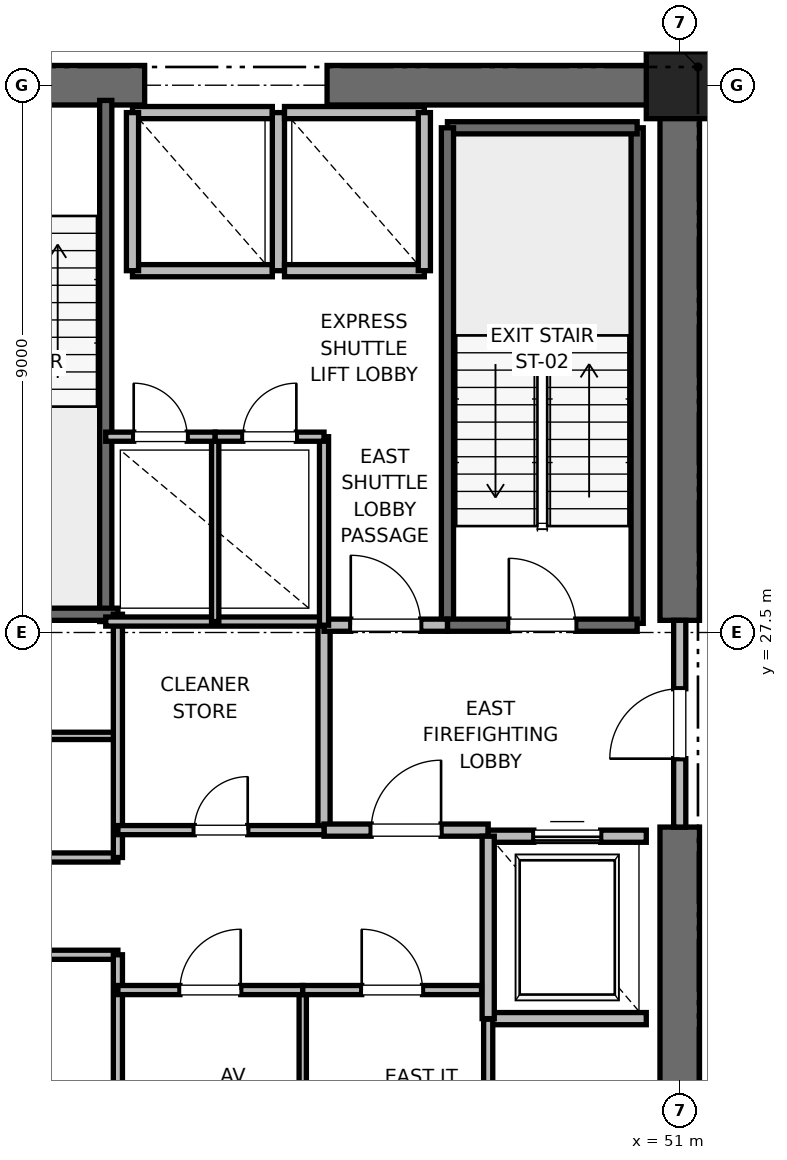
"""IFC4 building model, lengths in metres.
Left out: names, types, materials, properties, quantities, classifications, styles, units other than length and angle.
Written with IfcOpenShell. Run it as: python <this file> out.ifc"""

import sys

from ifc_helpers import new_model, si_unit, direction, frame, frame_2d, origin, origin_2d, place, context, subcontext, project, spatial, rectangle, extrude, element, fill, save


model = new_model("IFC4")
c1 = context("Model", 3, precision=1e-05, world=origin(), true_north=direction((0.0, 1.0)))
c2 = subcontext(c1, "Body", "Model", "MODEL_VIEW")
j1 = project(units=[si_unit("LENGTHUNIT", "METRE"), si_unit("PLANEANGLEUNIT", "RADIAN")], contexts=[c1])
p1 = place(None, origin())
s1 = spatial("IfcSite", under=j1, at=p1, CompositionType="ELEMENT")
p2 = place(p1, origin())
s2 = spatial("IfcBuilding", under=s1, at=p2, CompositionType="ELEMENT")
p3 = place(p2, frame((0.0, 0.0, 71.6)))
s3 = spatial("IfcBuildingStorey", under=s2, at=p3, CompositionType="ELEMENT", Elevation=71.6)
p4 = place(p3, frame((51.0, 36.5, 0.0), z_axis=(0.0, 0.0, 1.0), x_axis=(1.0, 0.0, 0.0)))
e1 = element("IfcColumn", 1, at=p4, inside=s3, PredefinedType="PILASTER", context=c2, shape_type="SweptSolid", body=[
    extrude(rectangle(XDim=1.1, YDim=1.1, at=origin_2d()), origin(), (0.0, 0.0, 1.0), 4.0),
])
p5 = place(p3, frame((37.8, 36.5, 0.0), z_axis=(0.0, 0.0, 1.0), x_axis=(1.0, 0.0, 0.0)))
e2 = element("IfcWall", 2, at=p5, inside=s3, PredefinedType="SHEAR", context=c2, shape_type="SweptSolid", body=[
    extrude(rectangle(XDim=4.4, YDim=0.65, at=frame_2d((2.2, 0.0))), origin(), (0.0, 0.0, 1.0), 3.76),
])
p6 = place(p5, frame((1.65, 0.0, 0.0)))
e3 = element("IfcOpeningElement", 3, at=p6, cuts=e2, PredefinedType="OPENING", context=c2, shape_type="SweptSolid", body=[
    extrude(rectangle(XDim=1.1, YDim=2.15, at=frame_2d((0.55, 1.075))), frame((0.0, 0.325, 0.0), z_axis=(0.0, -1.0, 0.0), x_axis=(1.0, 0.0, 0.0)), (0.0, 0.0, 1.0), 0.65),
])
for number, where, z_axis, x_axis in (
    (4, (45.2, 36.5, 0.0), (0.0, 0.0, 1.0), (1.0, 0.0, 0.0)),
    (5, (51.0, 18.5, 0.0), (0.0, 0.0, 1.0), (0.0, 1.0, 0.0)),
):
    element("IfcWall", number, at=place(p3, frame(where, z_axis=z_axis, x_axis=x_axis)), inside=s3, PredefinedType="SHEAR", context=c2, shape_type="SweptSolid", body=[
        extrude(rectangle(XDim=5.8, YDim=0.65, at=frame_2d((2.9, 0.0))), origin(), (0.0, 0.0, 1.0), 3.76),
    ])
p7 = place(p3, frame((51.0, 27.7, 0.0), z_axis=(0.0, 0.0, 1.0), x_axis=(0.0, 1.0, 0.0)))
e6 = element("IfcWall", 6, at=p7, inside=s3, PredefinedType="SHEAR", context=c2, shape_type="SweptSolid", body=[
    extrude(rectangle(XDim=8.8, YDim=0.65, at=frame_2d((4.4, 0.0))), origin(), (0.0, 0.0, 1.0), 3.76),
])
p8 = place(p3, frame((50.3, 27.65, 0.0), z_axis=(0.0, 0.0, 1.0), x_axis=(0.0, 1.0, 0.0)))
e7 = element("IfcWall", 7, at=p8, inside=s3, PredefinedType="SOLIDWALL", context=c2, shape_type="SweptSolid", body=[
    extrude(rectangle(XDim=8.15, YDim=0.2, at=frame_2d((4.075, 0.0))), origin(), (0.0, 0.0, 1.0), 3.76),
])
p9 = place(p3, frame((47.18, 35.8, 0.0), z_axis=(0.0, 0.0, 1.0), x_axis=(1.0, 0.0, 0.0)))
e8 = element("IfcWall", 8, at=p9, inside=s3, PredefinedType="SOLIDWALL", context=c2, shape_type="SweptSolid", body=[
    extrude(rectangle(XDim=3.12, YDim=0.2, at=frame_2d((1.56, 0.0))), origin(), (0.0, 0.0, 1.0), 3.76),
])
p10 = place(p3, frame((47.18, 27.62, 0.0), z_axis=(0.0, 0.0, 1.0), x_axis=(0.0, 1.0, 0.0)))
e9 = element("IfcWall", 9, at=p10, inside=s3, PredefinedType="SOLIDWALL", context=c2, shape_type="SweptSolid", body=[
    extrude(rectangle(XDim=8.18, YDim=0.2, at=frame_2d((4.09, 0.0))), origin(), (0.0, 0.0, 1.0), 3.76),
])
p11 = place(p3, frame((47.18, 27.62, 0.0), z_axis=(0.0, 0.0, 1.0), x_axis=(1.0, 0.0, 0.0)))
e10 = element("IfcWall", 10, at=p11, inside=s3, PredefinedType="SOLIDWALL", context=c2, shape_type="SweptSolid", body=[
    extrude(rectangle(XDim=3.12, YDim=0.2, at=frame_2d((1.56, 0.0))), origin(), (0.0, 0.0, 1.0), 3.76),
])
p12 = place(p11, frame((1.01, 0.0, 0.0)))
e11 = element("IfcOpeningElement", 11, at=p12, cuts=e10, PredefinedType="OPENING", context=c2, shape_type="SweptSolid", body=[
    extrude(rectangle(XDim=1.1, YDim=2.15, at=frame_2d((0.55, 1.075))), frame((0.0, 0.1, 0.0), z_axis=(0.0, -1.0, 0.0), x_axis=(1.0, 0.0, 0.0)), (0.0, 0.0, 1.0), 0.2),
])
p13 = place(p3, frame((41.56, 27.68, 0.0), z_axis=(0.0, 0.0, 1.0), x_axis=(0.0, 1.0, 0.0)))
e12 = element("IfcWall", 12, at=p13, inside=s3, PredefinedType="SOLIDWALL", context=c2, shape_type="SweptSolid", body=[
    extrude(rectangle(XDim=8.57, YDim=0.2, at=frame_2d((4.285, 0.0))), origin(), (0.0, 0.0, 1.0), 3.76),
])
p14 = place(p3, frame((38.44, 27.8, 0.0), z_axis=(0.0, 0.0, 1.0), x_axis=(1.0, 0.0, 0.0)))
e13 = element("IfcWall", 13, at=p14, inside=s3, PredefinedType="SOLIDWALL", context=c2, shape_type="SweptSolid", body=[
    extrude(rectangle(XDim=3.32, YDim=0.2, at=frame_2d((1.66, 0.0))), origin(), (0.0, 0.0, 1.0), 3.76),
])
p15 = place(p3, frame((45.15, 24.25, 0.0), z_axis=(0.0, 0.0, 1.0), x_axis=(0.0, 1.0, 0.0)))
e14 = element("IfcWall", 14, at=p15, inside=s3, PredefinedType="PARTITIONING", context=c2, shape_type="SweptSolid", body=[
    extrude(rectangle(XDim=3.37, YDim=0.2, at=frame_2d((1.685, 0.0))), origin(), (0.0, 0.0, 1.0), 3.76),
])
p16 = place(p3, frame((45.15, 24.25, 0.0), z_axis=(0.0, 0.0, 1.0), x_axis=(1.0, 0.0, 0.0)))
e15 = element("IfcWall", 15, at=p16, inside=s3, PredefinedType="PARTITIONING", context=c2, shape_type="SweptSolid", body=[
    extrude(rectangle(XDim=2.7, YDim=0.2, at=frame_2d((1.35, 0.0))), origin(), (0.0, 0.0, 1.0), 3.76),
])
p17 = place(p16, frame((0.775, 0.0, 0.0)))
e16 = element("IfcOpeningElement", 16, at=p17, cuts=e15, PredefinedType="OPENING", context=c2, shape_type="SweptSolid", body=[
    extrude(rectangle(XDim=1.15, YDim=2.2, at=frame_2d((0.575, 1.1))), frame((0.0, 0.1, 0.0), z_axis=(0.0, -1.0, 0.0), x_axis=(1.0, 0.0, 0.0)), (0.0, 0.0, 1.0), 0.2),
])
p18 = place(p3, frame((45.15, 27.62, 0.0), z_axis=(0.0, 0.0, 1.0), x_axis=(1.0, 0.0, 0.0)))
e17 = element("IfcWall", 17, at=p18, inside=s3, PredefinedType="PARTITIONING", context=c2, shape_type="SweptSolid", body=[
    extrude(rectangle(XDim=2.03, YDim=0.2, at=frame_2d((1.015, 0.0))), origin(), (0.0, 0.0, 1.0), 3.76),
])
p19 = place(p18, frame((0.44, 0.0, 0.0)))
e18 = element("IfcOpeningElement", 18, at=p19, cuts=e17, PredefinedType="OPENING", context=c2, shape_type="SweptSolid", body=[
    extrude(rectangle(XDim=1.15, YDim=2.2, at=frame_2d((0.575, 1.1))), frame((0.0, 0.1, 0.0), z_axis=(0.0, -1.0, 0.0), x_axis=(1.0, 0.0, 0.0)), (0.0, 0.0, 1.0), 0.2),
])
p20 = place(p3, frame((51.0, 24.3, 0.0), z_axis=(0.0, 0.0, 1.0), x_axis=(0.0, 1.0, 0.0)))
e19 = element("IfcWall", 19, at=p20, inside=s3, PredefinedType="PARTITIONING", context=c2, shape_type="SweptSolid", body=[
    extrude(rectangle(XDim=3.4, YDim=0.2, at=frame_2d((1.7, 0.0))), origin(), (0.0, 0.0, 1.0), 2.54),
])
p21 = place(p20, frame((1.125, 0.0, 0.0)))
e20 = element("IfcOpeningElement", 20, at=p21, cuts=e19, PredefinedType="OPENING", context=c2, shape_type="SweptSolid", body=[
    extrude(rectangle(XDim=1.15, YDim=2.2, at=frame_2d((0.575, 1.1))), frame((0.0, 0.1, 0.0), z_axis=(0.0, -1.0, 0.0), x_axis=(1.0, 0.0, 0.0)), (0.0, 0.0, 1.0), 0.2),
])
p22 = place(p3, frame((47.85, 21.15, 0.0), z_axis=(0.0, 0.0, 1.0), x_axis=(1.0, 0.0, 0.0)))
e21 = element("IfcWall", 21, at=p22, inside=s3, PredefinedType="SOLIDWALL", context=c2, shape_type="SweptSolid", body=[
    extrude(rectangle(XDim=2.6, YDim=0.2, at=frame_2d((1.3, 0.0))), origin(), (0.0, 0.0, 1.0), 3.76),
])
p23 = place(p3, frame((50.45, 24.15, 0.0), z_axis=(0.0, 0.0, 1.0), x_axis=(-1.0, 0.0, 0.0)))
e22 = element("IfcWall", 22, at=p23, inside=s3, PredefinedType="SOLIDWALL", context=c2, shape_type="SweptSolid", body=[
    extrude(rectangle(XDim=2.6, YDim=0.2, at=frame_2d((1.3, 0.0))), origin(), (0.0, 0.0, 1.0), 2.54),
])
p24 = place(p23, frame((0.75, 0.0, 0.0)))
e23 = element("IfcOpeningElement", 23, at=p24, cuts=e22, PredefinedType="OPENING", context=c2, shape_type="SweptSolid", body=[
    extrude(rectangle(XDim=1.1, YDim=2.2, at=frame_2d((0.55, 1.1))), frame((0.0, 0.1, 0.0), z_axis=(0.0, -1.0, 0.0), x_axis=(1.0, 0.0, 0.0)), (0.0, 0.0, 1.0), 0.2),
])
p25 = place(p3, frame((47.85, 24.15, 0.0), z_axis=(0.0, 0.0, 1.0), x_axis=(0.0, -1.0, 0.0)))
e24 = element("IfcWall", 24, at=p25, inside=s3, PredefinedType="SOLIDWALL", context=c2, shape_type="SweptSolid", body=[
    extrude(rectangle(XDim=3.0, YDim=0.2, at=frame_2d((1.5, 0.0))), origin(), (0.0, 0.0, 1.0), 3.76),
])
p26 = place(p3, frame((42.0, 33.45, 0.0), z_axis=(0.0, 0.0, 1.0), x_axis=(1.0, 0.0, 0.0)))
e25 = element("IfcWall", 25, at=p26, inside=s3, PredefinedType="SOLIDWALL", context=c2, shape_type="SweptSolid", body=[
    extrude(rectangle(XDim=2.3, YDim=0.2, at=frame_2d((1.15, 0.0))), origin(), (0.0, 0.0, 1.0), 3.76),
])
p27 = place(p3, frame((44.3, 36.05, 0.0), z_axis=(0.0, 0.0, 1.0), x_axis=(-1.0, 0.0, 0.0)))
e26 = element("IfcWall", 26, at=p27, inside=s3, PredefinedType="SOLIDWALL", context=c2, shape_type="SweptSolid", body=[
    extrude(rectangle(XDim=2.3, YDim=0.2, at=frame_2d((1.15, 0.0))), origin(), (0.0, 0.0, 1.0), 2.54),
])
for number, where, z_axis, x_axis in (
    (27, (42.0, 36.05, 0.0), (0.0, 0.0, 1.0), (0.0, -1.0, 0.0)),
    (28, (44.4, 33.45, 0.0), (0.0, 0.0, 1.0), (0.0, 1.0, 0.0)),
):
    element("IfcWall", number, at=place(p3, frame(where, z_axis=z_axis, x_axis=x_axis)), inside=s3, PredefinedType="SOLIDWALL", context=c2, shape_type="SweptSolid", body=[
        extrude(rectangle(XDim=2.6, YDim=0.2, at=frame_2d((1.3, 0.0))), origin(), (0.0, 0.0, 1.0), 2.54),
    ])
p28 = place(p3, frame((44.5, 33.45, 0.0), z_axis=(0.0, 0.0, 1.0), x_axis=(1.0, 0.0, 0.0)))
e29 = element("IfcWall", 29, at=p28, inside=s3, PredefinedType="SOLIDWALL", context=c2, shape_type="SweptSolid", body=[
    extrude(rectangle(XDim=2.3, YDim=0.2, at=frame_2d((1.15, 0.0))), origin(), (0.0, 0.0, 1.0), 3.76),
])
p29 = place(p3, frame((46.8, 36.05, 0.0), z_axis=(0.0, 0.0, 1.0), x_axis=(-1.0, 0.0, 0.0)))
e30 = element("IfcWall", 30, at=p29, inside=s3, PredefinedType="SOLIDWALL", context=c2, shape_type="SweptSolid", body=[
    extrude(rectangle(XDim=2.3, YDim=0.2, at=frame_2d((1.15, 0.0))), origin(), (0.0, 0.0, 1.0), 2.54),
])
p30 = place(p3, frame((46.8, 33.45, 0.0), z_axis=(0.0, 0.0, 1.0), x_axis=(0.0, 1.0, 0.0)))
e31 = element("IfcWall", 31, at=p30, inside=s3, PredefinedType="SOLIDWALL", context=c2, shape_type="SweptSolid", body=[
    extrude(rectangle(XDim=2.6, YDim=0.2, at=frame_2d((1.3, 0.0))), origin(), (0.0, 0.0, 1.0), 3.76),
])
for number, where, z_axis, x_axis in (
    (32, (39.95, 22.2, 0.0), (0.0, 0.0, 1.0), (1.0, 0.0, 0.0)),
    (33, (39.95, 23.8, 0.0), (0.0, 0.0, 1.0), (1.0, 0.0, 0.0)),
):
    element("IfcWall", number, at=place(p3, frame(where, z_axis=z_axis, x_axis=x_axis)), inside=s3, PredefinedType="PARTITIONING", context=c2, shape_type="SweptSolid", body=[
        extrude(rectangle(XDim=1.81, YDim=0.15, at=frame_2d((0.905, 0.0))), origin(), (0.0, 0.0, 1.0), 2.85),
    ])
p31 = place(p3, frame((39.95, 25.8, 0.0), z_axis=(0.0, 0.0, 1.0), x_axis=(1.0, 0.0, 0.0)))
e34 = element("IfcWall", 34, at=p31, inside=s3, PredefinedType="PARTITIONING", context=c2, shape_type="SweptSolid", body=[
    extrude(rectangle(XDim=1.81, YDim=0.12, at=frame_2d((0.905, 0.0))), origin(), (0.0, 0.0, 1.0), 2.85),
])
p32 = place(p3, frame((41.76, 18.6, 0.0), z_axis=(0.0, 0.0, 1.0), x_axis=(0.0, 1.0, 0.0)))
e35 = element("IfcWall", 35, at=p32, inside=s3, PredefinedType="PARTITIONING", context=c2, shape_type="SweptSolid", body=[
    extrude(rectangle(XDim=3.6, YDim=0.15, at=frame_2d((1.8, 0.0))), origin(), (0.0, 0.0, 1.0), 2.54),
])
p33 = place(p3, frame((41.76, 23.8, 0.0), z_axis=(0.0, 0.0, 1.0), x_axis=(0.0, 1.0, 0.0)))
e36 = element("IfcWall", 36, at=p33, inside=s3, PredefinedType="PARTITIONING", context=c2, shape_type="SweptSolid", body=[
    extrude(rectangle(XDim=4.0, YDim=0.15, at=frame_2d((2.0, 0.0))), origin(), (0.0, 0.0, 1.0), 2.85),
])
p34 = place(p3, frame((41.56, 27.68, 0.0), z_axis=(0.0, 0.0, 1.0), x_axis=(1.0, 0.0, 0.0)))
e37 = element("IfcWall", 37, at=p34, inside=s3, PredefinedType="PARTITIONING", context=c2, shape_type="SweptSolid", body=[
    extrude(rectangle(XDim=3.59, YDim=0.15, at=frame_2d((1.795, 0.0))), origin(), (0.0, 0.0, 1.0), 2.85),
])
p35 = place(p3, frame((47.85, 18.6, 0.0), z_axis=(0.0, 0.0, 1.0), x_axis=(0.0, 1.0, 0.0)))
e38 = element("IfcWall", 38, at=p35, inside=s3, PredefinedType="PARTITIONING", context=c2, shape_type="SweptSolid", body=[
    extrude(rectangle(XDim=2.54, YDim=0.15, at=frame_2d((1.27, 0.0))), origin(), (0.0, 0.0, 1.0), 2.85),
])
p36 = place(p3, frame((44.8, 18.6, 0.0), z_axis=(0.0, 0.0, 1.0), x_axis=(0.0, 1.0, 0.0)))
e39 = element("IfcWall", 39, at=p36, inside=s3, PredefinedType="PARTITIONING", context=c2, shape_type="SweptSolid", body=[
    extrude(rectangle(XDim=3.02, YDim=0.12, at=frame_2d((1.51, 0.0))), origin(), (0.0, 0.0, 1.0), 2.85),
])
p37 = place(p3, frame((41.76, 21.62, 0.0), z_axis=(0.0, 0.0, 1.0), x_axis=(1.0, 0.0, 0.0)))
e40 = element("IfcWall", 40, at=p37, inside=s3, PredefinedType="PARTITIONING", context=c2, shape_type="SweptSolid", body=[
    extrude(rectangle(XDim=3.04, YDim=0.15, at=frame_2d((1.52, 0.0))), origin(), (0.0, 0.0, 1.0), 2.85),
])
p38 = place(p37, frame((1.02, 0.0, 0.0)))
e41 = element("IfcOpeningElement", 41, at=p38, cuts=e40, PredefinedType="OPENING", context=c2, shape_type="SweptSolid", body=[
    extrude(rectangle(XDim=1.0, YDim=2.15, at=frame_2d((0.5, 1.075))), frame((0.0, 0.075, 0.0), z_axis=(0.0, -1.0, 0.0), x_axis=(1.0, 0.0, 0.0)), (0.0, 0.0, 1.0), 0.15),
])
p39 = place(p3, frame((44.8, 21.62, 0.0), z_axis=(0.0, 0.0, 1.0), x_axis=(1.0, 0.0, 0.0)))
e42 = element("IfcWall", 42, at=p39, inside=s3, PredefinedType="PARTITIONING", context=c2, shape_type="SweptSolid", body=[
    extrude(rectangle(XDim=2.94, YDim=0.15, at=frame_2d((1.47, 0.0))), origin(), (0.0, 0.0, 1.0), 2.85),
])
p40 = place(p39, frame((0.97, 0.0, 0.0)))
e43 = element("IfcOpeningElement", 43, at=p40, cuts=e42, PredefinedType="OPENING", context=c2, shape_type="SweptSolid", body=[
    extrude(rectangle(XDim=1.0, YDim=2.15, at=frame_2d((0.5, 1.075))), frame((0.0, 0.075, 0.0), z_axis=(0.0, -1.0, 0.0), x_axis=(1.0, 0.0, 0.0)), (0.0, 0.0, 1.0), 0.15),
])
p41 = place(p3, frame((41.76, 24.25, 0.0), z_axis=(0.0, 0.0, 1.0), x_axis=(1.0, 0.0, 0.0)))
e44 = element("IfcWall", 44, at=p41, inside=s3, PredefinedType="PARTITIONING", context=c2, shape_type="SweptSolid", body=[
    extrude(rectangle(XDim=3.39, YDim=0.15, at=frame_2d((1.695, 0.0))), origin(), (0.0, 0.0, 1.0), 2.85),
])
p42 = place(p41, frame((1.255, 0.0, 0.0)))
e45 = element("IfcOpeningElement", 45, at=p42, cuts=e44, PredefinedType="OPENING", context=c2, shape_type="SweptSolid", body=[
    extrude(rectangle(XDim=0.88, YDim=2.1, at=frame_2d((0.44, 1.05))), frame((0.0, 0.075, 0.0), z_axis=(0.0, -1.0, 0.0), x_axis=(1.0, 0.0, 0.0)), (0.0, 0.0, 1.0), 0.15),
])
p43 = place(p3, frame((45.15, 27.62, 0.0), z_axis=(0.0, 0.0, 1.0), x_axis=(0.0, 1.0, 0.0)))
e46 = element("IfcWall", 46, at=p43, inside=s3, PredefinedType="PARTITIONING", context=c2, shape_type="SweptSolid", body=[
    extrude(rectangle(XDim=3.1, YDim=0.15, at=frame_2d((1.55, 0.0))), origin(), (0.0, 0.0, 1.0), 2.85),
])
p44 = place(p3, frame((43.36, 27.68, 0.0), z_axis=(0.0, 0.0, 1.0), x_axis=(0.0, 1.0, 0.0)))
e47 = element("IfcWall", 47, at=p44, inside=s3, PredefinedType="PARTITIONING", context=c2, shape_type="SweptSolid", body=[
    extrude(rectangle(XDim=3.04, YDim=0.12, at=frame_2d((1.52, 0.0))), origin(), (0.0, 0.0, 1.0), 2.85),
])
p45 = place(p3, frame((41.56, 30.72, 0.0), z_axis=(0.0, 0.0, 1.0), x_axis=(1.0, 0.0, 0.0)))
e48 = element("IfcWall", 48, at=p45, inside=s3, PredefinedType="PARTITIONING", context=c2, shape_type="SweptSolid", body=[
    extrude(rectangle(XDim=1.8, YDim=0.15, at=frame_2d((0.9, 0.0))), origin(), (0.0, 0.0, 1.0), 2.85),
])
p46 = place(p45, frame((0.46, 0.0, 0.0)))
e49 = element("IfcOpeningElement", 49, at=p46, cuts=e48, PredefinedType="OPENING", context=c2, shape_type="SweptSolid", body=[
    extrude(rectangle(XDim=0.88, YDim=2.1, at=frame_2d((0.44, 1.05))), frame((0.0, 0.075, 0.0), z_axis=(0.0, -1.0, 0.0), x_axis=(1.0, 0.0, 0.0)), (0.0, 0.0, 1.0), 0.15),
])
p47 = place(p3, frame((43.36, 30.72, 0.0), z_axis=(0.0, 0.0, 1.0), x_axis=(1.0, 0.0, 0.0)))
e50 = element("IfcWall", 50, at=p47, inside=s3, PredefinedType="PARTITIONING", context=c2, shape_type="SweptSolid", body=[
    extrude(rectangle(XDim=1.79, YDim=0.15, at=frame_2d((0.895, 0.0))), origin(), (0.0, 0.0, 1.0), 2.85),
])
p48 = place(p47, frame((0.455, 0.0, 0.0)))
e51 = element("IfcOpeningElement", 51, at=p48, cuts=e50, PredefinedType="OPENING", context=c2, shape_type="SweptSolid", body=[
    extrude(rectangle(XDim=0.88, YDim=2.1, at=frame_2d((0.44, 1.05))), frame((0.0, 0.075, 0.0), z_axis=(0.0, -1.0, 0.0), x_axis=(1.0, 0.0, 0.0)), (0.0, 0.0, 1.0), 0.15),
])
p49 = place(p12, origin())
e52 = element("IfcDoor", 52, at=p49, inside=s3, OperationType="SINGLE_SWING_LEFT", PredefinedType="DOOR", context=c2, shape_type="SweptSolid", body=[
    extrude(rectangle(XDim=1.1, YDim=2.15, at=frame_2d((0.55, 1.075))), frame((0.0, 0.025, 0.0), z_axis=(0.0, -1.0, 0.0), x_axis=(1.0, 0.0, 0.0)), (0.0, 0.0, 1.0), 0.05),
])
fill(e11, e52)
p50 = place(p17, origin())
e53 = element("IfcDoor", 53, at=p50, inside=s3, OperationType="SINGLE_SWING_RIGHT", PredefinedType="DOOR", context=c2, shape_type="SweptSolid", body=[
    extrude(rectangle(XDim=1.15, YDim=2.2, at=frame_2d((0.575, 1.1))), frame((0.0, 0.025, 0.0), z_axis=(0.0, -1.0, 0.0), x_axis=(1.0, 0.0, 0.0)), (0.0, 0.0, 1.0), 0.05),
])
fill(e16, e53)
p51 = place(p19, origin())
e54 = element("IfcDoor", 54, at=p51, inside=s3, OperationType="SINGLE_SWING_LEFT", PredefinedType="DOOR", context=c2, shape_type="SweptSolid", body=[
    extrude(rectangle(XDim=1.15, YDim=2.2, at=frame_2d((0.575, 1.1))), frame((0.0, 0.025, 0.0), z_axis=(0.0, -1.0, 0.0), x_axis=(1.0, 0.0, 0.0)), (0.0, 0.0, 1.0), 0.05),
])
fill(e18, e54)
p52 = place(p21, origin())
e55 = element("IfcDoor", 55, at=p52, inside=s3, OperationType="SINGLE_SWING_LEFT", PredefinedType="DOOR", context=c2, shape_type="SweptSolid", body=[
    extrude(rectangle(XDim=1.15, YDim=2.2, at=frame_2d((0.575, 1.1))), frame((0.0, 0.025, 0.0), z_axis=(0.0, -1.0, 0.0), x_axis=(1.0, 0.0, 0.0)), (0.0, 0.0, 1.0), 0.05),
])
fill(e20, e55)
p53 = place(p24, origin())
e56 = element("IfcDoor", 56, at=p53, inside=s3, OperationType="SLIDING_TO_RIGHT", PredefinedType="DOOR", context=c2, shape_type="SweptSolid", body=[
    extrude(rectangle(XDim=1.1, YDim=2.2, at=frame_2d((0.55, 1.1))), frame((0.0, 0.025, 0.0), z_axis=(0.0, -1.0, 0.0), x_axis=(1.0, 0.0, 0.0)), (0.0, 0.0, 1.0), 0.05),
])
fill(e23, e56)
p54 = place(p38, origin())
e57 = element("IfcDoor", 57, at=p54, inside=s3, OperationType="SINGLE_SWING_RIGHT", PredefinedType="DOOR", context=c2, shape_type="SweptSolid", body=[
    extrude(rectangle(XDim=1.0, YDim=2.15, at=frame_2d((0.5, 1.075))), frame((0.0, 0.025, 0.0), z_axis=(0.0, -1.0, 0.0), x_axis=(1.0, 0.0, 0.0)), (0.0, 0.0, 1.0), 0.05),
])
fill(e41, e57)
p55 = place(p40, origin())
e58 = element("IfcDoor", 58, at=p55, inside=s3, OperationType="SINGLE_SWING_LEFT", PredefinedType="DOOR", context=c2, shape_type="SweptSolid", body=[
    extrude(rectangle(XDim=1.0, YDim=2.15, at=frame_2d((0.5, 1.075))), frame((0.0, 0.025, 0.0), z_axis=(0.0, -1.0, 0.0), x_axis=(1.0, 0.0, 0.0)), (0.0, 0.0, 1.0), 0.05),
])
fill(e43, e58)
p56 = place(p42, origin())
e59 = element("IfcDoor", 59, at=p56, inside=s3, OperationType="SINGLE_SWING_RIGHT", PredefinedType="DOOR", context=c2, shape_type="SweptSolid", body=[
    extrude(rectangle(XDim=0.88, YDim=2.1, at=frame_2d((0.44, 1.05))), frame((0.0, 0.025, 0.0), z_axis=(0.0, -1.0, 0.0), x_axis=(1.0, 0.0, 0.0)), (0.0, 0.0, 1.0), 0.05),
])
fill(e45, e59)
p57 = place(p46, origin())
e60 = element("IfcDoor", 60, at=p57, inside=s3, OperationType="SINGLE_SWING_LEFT", PredefinedType="DOOR", context=c2, shape_type="SweptSolid", body=[
    extrude(rectangle(XDim=0.88, YDim=2.1, at=frame_2d((0.44, 1.05))), frame((0.0, 0.025, 0.0), z_axis=(0.0, -1.0, 0.0), x_axis=(1.0, 0.0, 0.0)), (0.0, 0.0, 1.0), 0.05),
])
fill(e49, e60)
p58 = place(p48, origin())
e61 = element("IfcDoor", 61, at=p58, inside=s3, OperationType="SINGLE_SWING_RIGHT", PredefinedType="DOOR", context=c2, shape_type="SweptSolid", body=[
    extrude(rectangle(XDim=0.88, YDim=2.1, at=frame_2d((0.44, 1.05))), frame((0.0, 0.025, 0.0), z_axis=(0.0, -1.0, 0.0), x_axis=(1.0, 0.0, 0.0)), (0.0, 0.0, 1.0), 0.05),
])
fill(e51, e61)
save(model, sys.argv[1])
